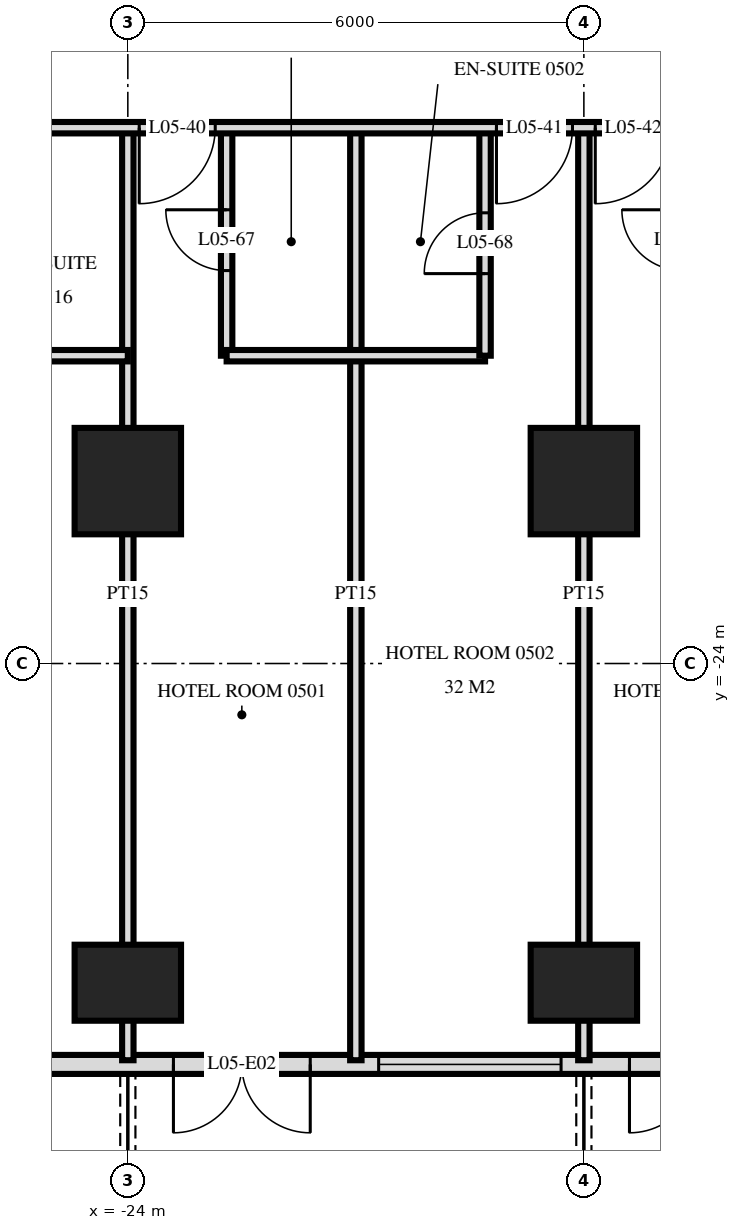
"""IFC4 building model, lengths in metres.
Left out: names, types, materials, properties, quantities, classifications, styles, units other than length and angle.
Written with IfcOpenShell. Run it as: python <this file> out.ifc"""

import sys

from ifc_helpers import new_model, si_unit, direction, frame, frame_2d, origin, origin_2d, place, context, subcontext, project, spatial, rectangle, extrude, element, fill, save


model = new_model("IFC4")
c1 = context("Model", 3, precision=1e-05, world=origin(), true_north=direction((0.0, 1.0)))
c2 = subcontext(c1, "Body", "Model", "MODEL_VIEW")
j1 = project(units=[si_unit("LENGTHUNIT", "METRE"), si_unit("PLANEANGLEUNIT", "RADIAN")], contexts=[c1])
p1 = place(None, origin())
s1 = spatial("IfcSite", under=j1, at=p1, CompositionType="ELEMENT")
p2 = place(p1, origin())
s2 = spatial("IfcBuilding", under=s1, at=p2, CompositionType="ELEMENT")
p3 = place(p2, frame((0.0, 0.0, 27.6)))
s3 = spatial("IfcBuildingStorey", under=s2, at=p3, CompositionType="ELEMENT", Elevation=27.6)
p4 = place(p3, frame((-24.0, -28.2, 0.0), z_axis=(0.0, 0.0, 1.0), x_axis=(1.0, 0.0, 0.0)))
e1 = element("IfcColumn", 1, at=p4, inside=s3, PredefinedType="COLUMN", context=c2, shape_type="SweptSolid", body=[
    extrude(rectangle(XDim=1.4, YDim=1.0, at=origin_2d()), origin(), (0.0, 0.0, 1.0), 3.6),
])
p5 = place(p3, frame((-24.0, -21.6, 0.0), z_axis=(0.0, 0.0, 1.0), x_axis=(1.0, 0.0, 0.0)))
e2 = element("IfcColumn", 2, at=p5, inside=s3, PredefinedType="COLUMN", context=c2, shape_type="SweptSolid", body=[
    extrude(rectangle(XDim=1.4, YDim=1.4, at=origin_2d()), origin(), (0.0, 0.0, 1.0), 3.6),
])
p6 = place(p3, frame((-18.0, -28.2, 0.0), z_axis=(0.0, 0.0, 1.0), x_axis=(1.0, 0.0, 0.0)))
e3 = element("IfcColumn", 3, at=p6, inside=s3, PredefinedType="COLUMN", context=c2, shape_type="SweptSolid", body=[
    extrude(rectangle(XDim=1.4, YDim=1.0, at=origin_2d()), origin(), (0.0, 0.0, 1.0), 3.6),
])
p7 = place(p3, frame((-18.0, -21.6, 0.0), z_axis=(0.0, 0.0, 1.0), x_axis=(1.0, 0.0, 0.0)))
e4 = element("IfcColumn", 4, at=p7, inside=s3, PredefinedType="COLUMN", context=c2, shape_type="SweptSolid", body=[
    extrude(rectangle(XDim=1.4, YDim=1.4, at=origin_2d()), origin(), (0.0, 0.0, 1.0), 3.6),
])
p8 = place(p3, frame((-28.775, -29.275, 0.0), z_axis=(0.0, 0.0, 1.0), x_axis=(1.0, 0.0, 0.0)))
e5 = element("IfcWall", 5, at=p8, inside=s3, PredefinedType="SOLIDWALL", context=c2, shape_type="SweptSolid", body=[
    extrude(rectangle(XDim=57.551, YDim=0.25, at=frame_2d((28.775, 0.0))), origin(), (0.0, 0.0, 1.0), 3.32),
])
p9 = place(p8, frame((0.575, 0.0, 0.0)))
e6 = element("IfcOpeningElement", 6, at=p9, cuts=e5, PredefinedType="OPENING", context=c2, shape_type="SweptSolid", body=[
    extrude(rectangle(XDim=1.8, YDim=2.4, at=frame_2d((0.9, 1.2))), frame((0.0, 0.135, 0.0), z_axis=(0.0, -1.0, 0.0), x_axis=(1.0, 0.0, 0.0)), (0.0, 0.0, 1.0), 0.27),
])
p10 = place(p8, frame((5.375, 0.0, 0.0)))
e7 = element("IfcOpeningElement", 7, at=p10, cuts=e5, PredefinedType="OPENING", context=c2, shape_type="SweptSolid", body=[
    extrude(rectangle(XDim=1.8, YDim=2.4, at=frame_2d((0.9, 1.2))), frame((0.0, 0.135, 0.0), z_axis=(0.0, -1.0, 0.0), x_axis=(1.0, 0.0, 0.0)), (0.0, 0.0, 1.0), 0.27),
])
p11 = place(p8, frame((8.075, 0.0, 0.3)))
e8 = element("IfcOpeningElement", 8, at=p11, cuts=e5, PredefinedType="OPENING", context=c2, shape_type="SweptSolid", body=[
    extrude(rectangle(XDim=2.4, YDim=2.1, at=frame_2d((1.2, 1.05))), frame((0.0, 0.135, 0.0), z_axis=(0.0, -1.0, 0.0), x_axis=(1.0, 0.0, 0.0)), (0.0, 0.0, 1.0), 0.27),
])
p12 = place(p8, frame((11.375, 0.0, 0.0)))
e9 = element("IfcOpeningElement", 9, at=p12, cuts=e5, PredefinedType="OPENING", context=c2, shape_type="SweptSolid", body=[
    extrude(rectangle(XDim=1.8, YDim=2.4, at=frame_2d((0.9, 1.2))), frame((0.0, 0.135, 0.0), z_axis=(0.0, -1.0, 0.0), x_axis=(1.0, 0.0, 0.0)), (0.0, 0.0, 1.0), 0.27),
])
p13 = place(p8, frame((14.075, 0.0, 0.3)))
e10 = element("IfcOpeningElement", 10, at=p13, cuts=e5, PredefinedType="OPENING", context=c2, shape_type="SweptSolid", body=[
    extrude(rectangle(XDim=2.4, YDim=2.1, at=frame_2d((1.2, 1.05))), frame((0.0, 0.135, 0.0), z_axis=(0.0, -1.0, 0.0), x_axis=(1.0, 0.0, 0.0)), (0.0, 0.0, 1.0), 0.27),
])
p14 = place(p8, frame((17.375, 0.0, 0.0)))
e11 = element("IfcOpeningElement", 11, at=p14, cuts=e5, PredefinedType="OPENING", context=c2, shape_type="SweptSolid", body=[
    extrude(rectangle(XDim=1.8, YDim=2.4, at=frame_2d((0.9, 1.2))), frame((0.0, 0.135, 0.0), z_axis=(0.0, -1.0, 0.0), x_axis=(1.0, 0.0, 0.0)), (0.0, 0.0, 1.0), 0.27),
])
p15 = place(p8, frame((20.075, 0.0, 0.3)))
e12 = element("IfcOpeningElement", 12, at=p15, cuts=e5, PredefinedType="OPENING", context=c2, shape_type="SweptSolid", body=[
    extrude(rectangle(XDim=2.4, YDim=2.1, at=frame_2d((1.2, 1.05))), frame((0.0, 0.135, 0.0), z_axis=(0.0, -1.0, 0.0), x_axis=(1.0, 0.0, 0.0)), (0.0, 0.0, 1.0), 0.27),
])
p16 = place(p8, frame((23.075, 0.0, 0.3)))
e13 = element("IfcOpeningElement", 13, at=p16, cuts=e5, PredefinedType="OPENING", context=c2, shape_type="SweptSolid", body=[
    extrude(rectangle(XDim=2.4, YDim=2.1, at=frame_2d((1.2, 1.05))), frame((0.0, 0.135, 0.0), z_axis=(0.0, -1.0, 0.0), x_axis=(1.0, 0.0, 0.0)), (0.0, 0.0, 1.0), 0.27),
])
p17 = place(p8, frame((26.375, 0.0, 0.0)))
e14 = element("IfcOpeningElement", 14, at=p17, cuts=e5, PredefinedType="OPENING", context=c2, shape_type="SweptSolid", body=[
    extrude(rectangle(XDim=1.8, YDim=2.4, at=frame_2d((0.9, 1.2))), frame((0.0, 0.135, 0.0), z_axis=(0.0, -1.0, 0.0), x_axis=(1.0, 0.0, 0.0)), (0.0, 0.0, 1.0), 0.27),
])
p18 = place(p8, frame((29.375, 0.0, 0.0)))
e15 = element("IfcOpeningElement", 15, at=p18, cuts=e5, PredefinedType="OPENING", context=c2, shape_type="SweptSolid", body=[
    extrude(rectangle(XDim=1.8, YDim=2.4, at=frame_2d((0.9, 1.2))), frame((0.0, 0.135, 0.0), z_axis=(0.0, -1.0, 0.0), x_axis=(1.0, 0.0, 0.0)), (0.0, 0.0, 1.0), 0.27),
])
p19 = place(p8, frame((32.075, 0.0, 0.3)))
e16 = element("IfcOpeningElement", 16, at=p19, cuts=e5, PredefinedType="OPENING", context=c2, shape_type="SweptSolid", body=[
    extrude(rectangle(XDim=2.4, YDim=2.1, at=frame_2d((1.2, 1.05))), frame((0.0, 0.135, 0.0), z_axis=(0.0, -1.0, 0.0), x_axis=(1.0, 0.0, 0.0)), (0.0, 0.0, 1.0), 0.27),
])
p20 = place(p8, frame((35.375, 0.0, 0.0)))
e17 = element("IfcOpeningElement", 17, at=p20, cuts=e5, PredefinedType="OPENING", context=c2, shape_type="SweptSolid", body=[
    extrude(rectangle(XDim=1.8, YDim=2.4, at=frame_2d((0.9, 1.2))), frame((0.0, 0.135, 0.0), z_axis=(0.0, -1.0, 0.0), x_axis=(1.0, 0.0, 0.0)), (0.0, 0.0, 1.0), 0.27),
])
p21 = place(p8, frame((38.075, 0.0, 0.3)))
e18 = element("IfcOpeningElement", 18, at=p21, cuts=e5, PredefinedType="OPENING", context=c2, shape_type="SweptSolid", body=[
    extrude(rectangle(XDim=2.4, YDim=2.1, at=frame_2d((1.2, 1.05))), frame((0.0, 0.135, 0.0), z_axis=(0.0, -1.0, 0.0), x_axis=(1.0, 0.0, 0.0)), (0.0, 0.0, 1.0), 0.27),
])
p22 = place(p8, frame((41.375, 0.0, 0.0)))
e19 = element("IfcOpeningElement", 19, at=p22, cuts=e5, PredefinedType="OPENING", context=c2, shape_type="SweptSolid", body=[
    extrude(rectangle(XDim=1.8, YDim=2.4, at=frame_2d((0.9, 1.2))), frame((0.0, 0.135, 0.0), z_axis=(0.0, -1.0, 0.0), x_axis=(1.0, 0.0, 0.0)), (0.0, 0.0, 1.0), 0.27),
])
p23 = place(p8, frame((44.075, 0.0, 0.3)))
e20 = element("IfcOpeningElement", 20, at=p23, cuts=e5, PredefinedType="OPENING", context=c2, shape_type="SweptSolid", body=[
    extrude(rectangle(XDim=2.4, YDim=2.1, at=frame_2d((1.2, 1.05))), frame((0.0, 0.135, 0.0), z_axis=(0.0, -1.0, 0.0), x_axis=(1.0, 0.0, 0.0)), (0.0, 0.0, 1.0), 0.27),
])
p24 = place(p8, frame((47.075, 0.0, 0.3)))
e21 = element("IfcOpeningElement", 21, at=p24, cuts=e5, PredefinedType="OPENING", context=c2, shape_type="SweptSolid", body=[
    extrude(rectangle(XDim=2.4, YDim=2.1, at=frame_2d((1.2, 1.05))), frame((0.0, 0.135, 0.0), z_axis=(0.0, -1.0, 0.0), x_axis=(1.0, 0.0, 0.0)), (0.0, 0.0, 1.0), 0.27),
])
p25 = place(p8, frame((50.375, 0.0, 0.0)))
e22 = element("IfcOpeningElement", 22, at=p25, cuts=e5, PredefinedType="OPENING", context=c2, shape_type="SweptSolid", body=[
    extrude(rectangle(XDim=1.8, YDim=2.4, at=frame_2d((0.9, 1.2))), frame((0.0, 0.135, 0.0), z_axis=(0.0, -1.0, 0.0), x_axis=(1.0, 0.0, 0.0)), (0.0, 0.0, 1.0), 0.27),
])
p26 = place(p8, frame((53.375, 0.0, 0.0)))
e23 = element("IfcOpeningElement", 23, at=p26, cuts=e5, PredefinedType="OPENING", context=c2, shape_type="SweptSolid", body=[
    extrude(rectangle(XDim=1.8, YDim=2.4, at=frame_2d((0.9, 1.2))), frame((0.0, 0.135, 0.0), z_axis=(0.0, -1.0, 0.0), x_axis=(1.0, 0.0, 0.0)), (0.0, 0.0, 1.0), 0.27),
])
p27 = place(p3, frame((-18.0, -29.22, 0.0), z_axis=(0.0, 0.0, 1.0), x_axis=(0.0, 1.0, 0.0)))
e24 = element("IfcWall", 24, at=p27, inside=s3, PredefinedType="PARTITIONING", context=c2, shape_type="SweptSolid", body=[
    extrude(rectangle(XDim=12.27, YDim=0.15, at=frame_2d((6.135, 0.0))), origin(), (0.0, 0.0, 1.0), 3.32),
])
p28 = place(p3, frame((-19.3, -19.95, 0.0), z_axis=(0.0, 0.0, 1.0), x_axis=(0.0, 1.0, 0.0)))
e25 = element("IfcWall", 25, at=p28, inside=s3, PredefinedType="PARTITIONING", context=c2, shape_type="SweptSolid", body=[
    extrude(rectangle(XDim=3.0, YDim=0.15, at=frame_2d((1.5, 0.0))), origin(), (0.0, 0.0, 1.0), 3.32),
])
p29 = place(p28, frame((1.08, 0.0, 0.0)))
e26 = element("IfcOpeningElement", 26, at=p29, cuts=e25, PredefinedType="OPENING", context=c2, shape_type="SweptSolid", body=[
    extrude(rectangle(XDim=0.8, YDim=2.1, at=frame_2d((0.4, 1.05))), frame((0.0, 0.085, 0.0), z_axis=(0.0, -1.0, 0.0), x_axis=(1.0, 0.0, 0.0)), (0.0, 0.0, 1.0), 0.17),
])
p30 = place(p3, frame((-21.0, -29.22, 0.0), z_axis=(0.0, 0.0, 1.0), x_axis=(0.0, 1.0, 0.0)))
e27 = element("IfcWall", 27, at=p30, inside=s3, PredefinedType="PARTITIONING", context=c2, shape_type="SweptSolid", body=[
    extrude(rectangle(XDim=12.27, YDim=0.15, at=frame_2d((6.135, 0.0))), origin(), (0.0, 0.0, 1.0), 3.32),
])
p31 = place(p3, frame((-22.7, -19.95, 0.0), z_axis=(0.0, 0.0, 1.0), x_axis=(0.0, 1.0, 0.0)))
e28 = element("IfcWall", 28, at=p31, inside=s3, PredefinedType="PARTITIONING", context=c2, shape_type="SweptSolid", body=[
    extrude(rectangle(XDim=3.0, YDim=0.15, at=frame_2d((1.5, 0.0))), origin(), (0.0, 0.0, 1.0), 3.32),
])
p32 = place(p31, frame((1.12, 0.0, 0.0)))
e29 = element("IfcOpeningElement", 29, at=p32, cuts=e28, PredefinedType="OPENING", context=c2, shape_type="SweptSolid", body=[
    extrude(rectangle(XDim=0.8, YDim=2.1, at=frame_2d((0.4, 1.05))), frame((0.0, 0.085, 0.0), z_axis=(0.0, -1.0, 0.0), x_axis=(1.0, 0.0, 0.0)), (0.0, 0.0, 1.0), 0.17),
])
p33 = place(p3, frame((-24.0, -29.22, 0.0), z_axis=(0.0, 0.0, 1.0), x_axis=(0.0, 1.0, 0.0)))
e30 = element("IfcWall", 30, at=p33, inside=s3, PredefinedType="PARTITIONING", context=c2, shape_type="SweptSolid", body=[
    extrude(rectangle(XDim=12.27, YDim=0.15, at=frame_2d((6.135, 0.0))), origin(), (0.0, 0.0, 1.0), 3.32),
])
p34 = place(p3, frame((-27.0, -19.95, 0.0), z_axis=(0.0, 0.0, 1.0), x_axis=(1.0, 0.0, 0.0)))
e31 = element("IfcWall", 31, at=p34, inside=s3, PredefinedType="PARTITIONING", context=c2, shape_type="SweptSolid", body=[
    extrude(rectangle(XDim=3.0, YDim=0.15, at=frame_2d((1.5, 0.0))), origin(), (0.0, 0.0, 1.0), 3.32),
])
p35 = place(p3, frame((-22.7, -19.95, 0.0), z_axis=(0.0, 0.0, 1.0), x_axis=(1.0, 0.0, 0.0)))
e32 = element("IfcWall", 32, at=p35, inside=s3, PredefinedType="PARTITIONING", context=c2, shape_type="SweptSolid", body=[
    extrude(rectangle(XDim=3.4, YDim=0.15, at=frame_2d((1.7, 0.0))), origin(), (0.0, 0.0, 1.0), 3.32),
])
p36 = place(p3, frame((-33.12, -16.95, 0.0), z_axis=(0.0, 0.0, 1.0), x_axis=(1.0, 0.0, 0.0)))
e33 = element("IfcWall", 33, at=p36, inside=s3, PredefinedType="PARTITIONING", context=c2, shape_type="SweptSolid", body=[
    extrude(rectangle(XDim=66.24, YDim=0.15, at=frame_2d((33.12, 0.0))), origin(), (0.0, 0.0, 1.0), 3.32),
])
p37 = place(p36, frame((9.27, 0.0, 0.0)))
e34 = element("IfcOpeningElement", 34, at=p37, cuts=e33, PredefinedType="OPENING", context=c2, shape_type="SweptSolid", body=[
    extrude(rectangle(XDim=1.0, YDim=2.1, at=frame_2d((0.5, 1.05))), frame((0.0, 0.085, 0.0), z_axis=(0.0, -1.0, 0.0), x_axis=(1.0, 0.0, 0.0)), (0.0, 0.0, 1.0), 0.17),
])
p38 = place(p36, frame((13.97, 0.0, 0.0)))
e35 = element("IfcOpeningElement", 35, at=p38, cuts=e33, PredefinedType="OPENING", context=c2, shape_type="SweptSolid", body=[
    extrude(rectangle(XDim=1.0, YDim=2.1, at=frame_2d((0.5, 1.05))), frame((0.0, 0.085, 0.0), z_axis=(0.0, -1.0, 0.0), x_axis=(1.0, 0.0, 0.0)), (0.0, 0.0, 1.0), 0.17),
])
p39 = place(p36, frame((15.27, 0.0, 0.0)))
e36 = element("IfcOpeningElement", 36, at=p39, cuts=e33, PredefinedType="OPENING", context=c2, shape_type="SweptSolid", body=[
    extrude(rectangle(XDim=1.0, YDim=2.1, at=frame_2d((0.5, 1.05))), frame((0.0, 0.085, 0.0), z_axis=(0.0, -1.0, 0.0), x_axis=(1.0, 0.0, 0.0)), (0.0, 0.0, 1.0), 0.17),
])
p40 = place(p36, frame((19.97, 0.0, 0.0)))
e37 = element("IfcOpeningElement", 37, at=p40, cuts=e33, PredefinedType="OPENING", context=c2, shape_type="SweptSolid", body=[
    extrude(rectangle(XDim=1.0, YDim=2.1, at=frame_2d((0.5, 1.05))), frame((0.0, 0.085, 0.0), z_axis=(0.0, -1.0, 0.0), x_axis=(1.0, 0.0, 0.0)), (0.0, 0.0, 1.0), 0.17),
])
p41 = place(p36, frame((22.27, 0.0, 0.0)))
e38 = element("IfcOpeningElement", 38, at=p41, cuts=e33, PredefinedType="OPENING", context=c2, shape_type="SweptSolid", body=[
    extrude(rectangle(XDim=1.0, YDim=2.1, at=frame_2d((0.5, 1.05))), frame((0.0, 0.085, 0.0), z_axis=(0.0, -1.0, 0.0), x_axis=(1.0, 0.0, 0.0)), (0.0, 0.0, 1.0), 0.17),
])
p42 = place(p36, frame((28.97, 0.0, 0.0)))
e39 = element("IfcOpeningElement", 39, at=p42, cuts=e33, PredefinedType="OPENING", context=c2, shape_type="SweptSolid", body=[
    extrude(rectangle(XDim=1.0, YDim=2.1, at=frame_2d((0.5, 1.05))), frame((0.0, 0.085, 0.0), z_axis=(0.0, -1.0, 0.0), x_axis=(1.0, 0.0, 0.0)), (0.0, 0.0, 1.0), 0.17),
])
p43 = place(p36, frame((30.27, 0.0, 0.0)))
e40 = element("IfcOpeningElement", 40, at=p43, cuts=e33, PredefinedType="OPENING", context=c2, shape_type="SweptSolid", body=[
    extrude(rectangle(XDim=1.0, YDim=2.1, at=frame_2d((0.5, 1.05))), frame((0.0, 0.085, 0.0), z_axis=(0.0, -1.0, 0.0), x_axis=(1.0, 0.0, 0.0)), (0.0, 0.0, 1.0), 0.17),
])
p44 = place(p36, frame((34.97, 0.0, 0.0)))
e41 = element("IfcOpeningElement", 41, at=p44, cuts=e33, PredefinedType="OPENING", context=c2, shape_type="SweptSolid", body=[
    extrude(rectangle(XDim=1.0, YDim=2.1, at=frame_2d((0.5, 1.05))), frame((0.0, 0.085, 0.0), z_axis=(0.0, -1.0, 0.0), x_axis=(1.0, 0.0, 0.0)), (0.0, 0.0, 1.0), 0.17),
])
p45 = place(p36, frame((36.27, 0.0, 0.0)))
e42 = element("IfcOpeningElement", 42, at=p45, cuts=e33, PredefinedType="OPENING", context=c2, shape_type="SweptSolid", body=[
    extrude(rectangle(XDim=1.0, YDim=2.1, at=frame_2d((0.5, 1.05))), frame((0.0, 0.085, 0.0), z_axis=(0.0, -1.0, 0.0), x_axis=(1.0, 0.0, 0.0)), (0.0, 0.0, 1.0), 0.17),
])
p46 = place(p36, frame((40.97, 0.0, 0.0)))
e43 = element("IfcOpeningElement", 43, at=p46, cuts=e33, PredefinedType="OPENING", context=c2, shape_type="SweptSolid", body=[
    extrude(rectangle(XDim=1.0, YDim=2.1, at=frame_2d((0.5, 1.05))), frame((0.0, 0.085, 0.0), z_axis=(0.0, -1.0, 0.0), x_axis=(1.0, 0.0, 0.0)), (0.0, 0.0, 1.0), 0.17),
])
p47 = place(p36, frame((42.27, 0.0, 0.0)))
e44 = element("IfcOpeningElement", 44, at=p47, cuts=e33, PredefinedType="OPENING", context=c2, shape_type="SweptSolid", body=[
    extrude(rectangle(XDim=1.0, YDim=2.1, at=frame_2d((0.5, 1.05))), frame((0.0, 0.085, 0.0), z_axis=(0.0, -1.0, 0.0), x_axis=(1.0, 0.0, 0.0)), (0.0, 0.0, 1.0), 0.17),
])
p48 = place(p36, frame((46.97, 0.0, 0.0)))
e45 = element("IfcOpeningElement", 45, at=p48, cuts=e33, PredefinedType="OPENING", context=c2, shape_type="SweptSolid", body=[
    extrude(rectangle(XDim=1.0, YDim=2.1, at=frame_2d((0.5, 1.05))), frame((0.0, 0.085, 0.0), z_axis=(0.0, -1.0, 0.0), x_axis=(1.0, 0.0, 0.0)), (0.0, 0.0, 1.0), 0.17),
])
p49 = place(p36, frame((48.27, 0.0, 0.0)))
e46 = element("IfcOpeningElement", 46, at=p49, cuts=e33, PredefinedType="OPENING", context=c2, shape_type="SweptSolid", body=[
    extrude(rectangle(XDim=1.0, YDim=2.1, at=frame_2d((0.5, 1.05))), frame((0.0, 0.085, 0.0), z_axis=(0.0, -1.0, 0.0), x_axis=(1.0, 0.0, 0.0)), (0.0, 0.0, 1.0), 0.17),
])
p50 = place(p36, frame((52.97, 0.0, 0.0)))
e47 = element("IfcOpeningElement", 47, at=p50, cuts=e33, PredefinedType="OPENING", context=c2, shape_type="SweptSolid", body=[
    extrude(rectangle(XDim=1.0, YDim=2.1, at=frame_2d((0.5, 1.05))), frame((0.0, 0.085, 0.0), z_axis=(0.0, -1.0, 0.0), x_axis=(1.0, 0.0, 0.0)), (0.0, 0.0, 1.0), 0.17),
])
p51 = place(p36, frame((54.27, 0.0, 0.0)))
e48 = element("IfcOpeningElement", 48, at=p51, cuts=e33, PredefinedType="OPENING", context=c2, shape_type="SweptSolid", body=[
    extrude(rectangle(XDim=1.0, YDim=2.1, at=frame_2d((0.5, 1.05))), frame((0.0, 0.085, 0.0), z_axis=(0.0, -1.0, 0.0), x_axis=(1.0, 0.0, 0.0)), (0.0, 0.0, 1.0), 0.17),
])
p52 = place(p36, frame((4.4, 0.0, 0.0)))
e49 = element("IfcOpeningElement", 49, at=p52, cuts=e33, PredefinedType="OPENING", context=c2, shape_type="SweptSolid", body=[
    extrude(rectangle(XDim=1.0, YDim=2.1, at=frame_2d((0.5, 1.05))), frame((0.0, 0.085, 0.0), z_axis=(0.0, -1.0, 0.0), x_axis=(1.0, 0.0, 0.0)), (0.0, 0.0, 1.0), 0.17),
])
p53 = place(p36, frame((60.8, 0.0, 0.0)))
e50 = element("IfcOpeningElement", 50, at=p53, cuts=e33, PredefinedType="OPENING", context=c2, shape_type="SweptSolid", body=[
    extrude(rectangle(XDim=1.0, YDim=2.1, at=frame_2d((0.5, 1.05))), frame((0.0, 0.085, 0.0), z_axis=(0.0, -1.0, 0.0), x_axis=(1.0, 0.0, 0.0)), (0.0, 0.0, 1.0), 0.17),
])
p54 = place(p10, frame((0.9, 0.0, 0.0), z_axis=(0.0, 0.0, 1.0), x_axis=(-1.0, 0.0, 0.0)))
e51 = element("IfcDoor", 51, at=p54, inside=s3, OperationType="DOUBLE_DOOR_SINGLE_SWING", PredefinedType="DOOR", context=c2, shape_type="SweptSolid", body=[
    extrude(rectangle(XDim=1.8, YDim=2.4, at=frame_2d((0.0, 1.2))), frame((0.0, -0.025, 0.0), z_axis=(0.0, 1.0, 0.0), x_axis=(-1.0, 0.0, 0.0)), (0.0, 0.0, 1.0), 0.05),
])
fill(e7, e51)
p55 = place(p11, origin())
e52 = element("IfcWindow", 52, at=p55, inside=s3, PartitioningType="SINGLE_PANEL", PredefinedType="WINDOW", context=c2, shape_type="SweptSolid", body=[
    extrude(rectangle(XDim=2.4, YDim=2.1, at=frame_2d((1.2, 1.05))), frame((0.0, 0.03, 0.0), z_axis=(0.0, -1.0, 0.0), x_axis=(1.0, 0.0, 0.0)), (0.0, 0.0, 1.0), 0.06),
])
fill(e8, e52)
p56 = place(p12, frame((0.9, 0.0, 0.0), z_axis=(0.0, 0.0, 1.0), x_axis=(-1.0, 0.0, 0.0)))
e53 = element("IfcDoor", 53, at=p56, inside=s3, OperationType="DOUBLE_DOOR_SINGLE_SWING", PredefinedType="DOOR", context=c2, shape_type="SweptSolid", body=[
    extrude(rectangle(XDim=1.8, YDim=2.4, at=frame_2d((0.0, 1.2))), frame((0.0, -0.025, 0.0), z_axis=(0.0, 1.0, 0.0), x_axis=(-1.0, 0.0, 0.0)), (0.0, 0.0, 1.0), 0.05),
])
fill(e9, e53)
p57 = place(p37, frame((0.5, 0.0, 0.0), z_axis=(0.0, 0.0, 1.0), x_axis=(-1.0, 0.0, 0.0)))
e54 = element("IfcDoor", 54, at=p57, inside=s3, OperationType="SINGLE_SWING_LEFT", PredefinedType="DOOR", context=c2, shape_type="SweptSolid", body=[
    extrude(rectangle(XDim=1.0, YDim=2.1, at=frame_2d((0.0, 1.05))), frame((0.0, -0.025, 0.0), z_axis=(0.0, 1.0, 0.0), x_axis=(-1.0, 0.0, 0.0)), (0.0, 0.0, 1.0), 0.05),
])
fill(e34, e54)
p58 = place(p38, frame((0.5, 0.0, 0.0), z_axis=(0.0, 0.0, 1.0), x_axis=(-1.0, 0.0, 0.0)))
e55 = element("IfcDoor", 55, at=p58, inside=s3, OperationType="SINGLE_SWING_LEFT", PredefinedType="DOOR", context=c2, shape_type="SweptSolid", body=[
    extrude(rectangle(XDim=1.0, YDim=2.1, at=frame_2d((0.0, 1.05))), frame((0.0, -0.025, 0.0), z_axis=(0.0, 1.0, 0.0), x_axis=(-1.0, 0.0, 0.0)), (0.0, 0.0, 1.0), 0.05),
])
fill(e35, e55)
p59 = place(p39, frame((0.5, 0.0, 0.0), z_axis=(0.0, 0.0, 1.0), x_axis=(-1.0, 0.0, 0.0)))
e56 = element("IfcDoor", 56, at=p59, inside=s3, OperationType="SINGLE_SWING_LEFT", PredefinedType="DOOR", context=c2, shape_type="SweptSolid", body=[
    extrude(rectangle(XDim=1.0, YDim=2.1, at=frame_2d((0.0, 1.05))), frame((0.0, -0.025, 0.0), z_axis=(0.0, 1.0, 0.0), x_axis=(-1.0, 0.0, 0.0)), (0.0, 0.0, 1.0), 0.05),
])
fill(e36, e56)
p60 = place(p32, origin())
e57 = element("IfcDoor", 57, at=p60, inside=s3, OperationType="SINGLE_SWING_LEFT", PredefinedType="DOOR", context=c2, shape_type="SweptSolid", body=[
    extrude(rectangle(XDim=0.8, YDim=2.1, at=frame_2d((0.4, 1.05))), frame((0.0, 0.025, 0.0), z_axis=(0.0, -1.0, 0.0), x_axis=(1.0, 0.0, 0.0)), (0.0, 0.0, 1.0), 0.05),
])
fill(e29, e57)
p61 = place(p29, origin())
e58 = element("IfcDoor", 58, at=p61, inside=s3, OperationType="SINGLE_SWING_RIGHT", PredefinedType="DOOR", context=c2, shape_type="SweptSolid", body=[
    extrude(rectangle(XDim=0.8, YDim=2.1, at=frame_2d((0.4, 1.05))), frame((0.0, 0.025, 0.0), z_axis=(0.0, -1.0, 0.0), x_axis=(1.0, 0.0, 0.0)), (0.0, 0.0, 1.0), 0.05),
])
fill(e26, e58)
save(model, sys.argv[1])
